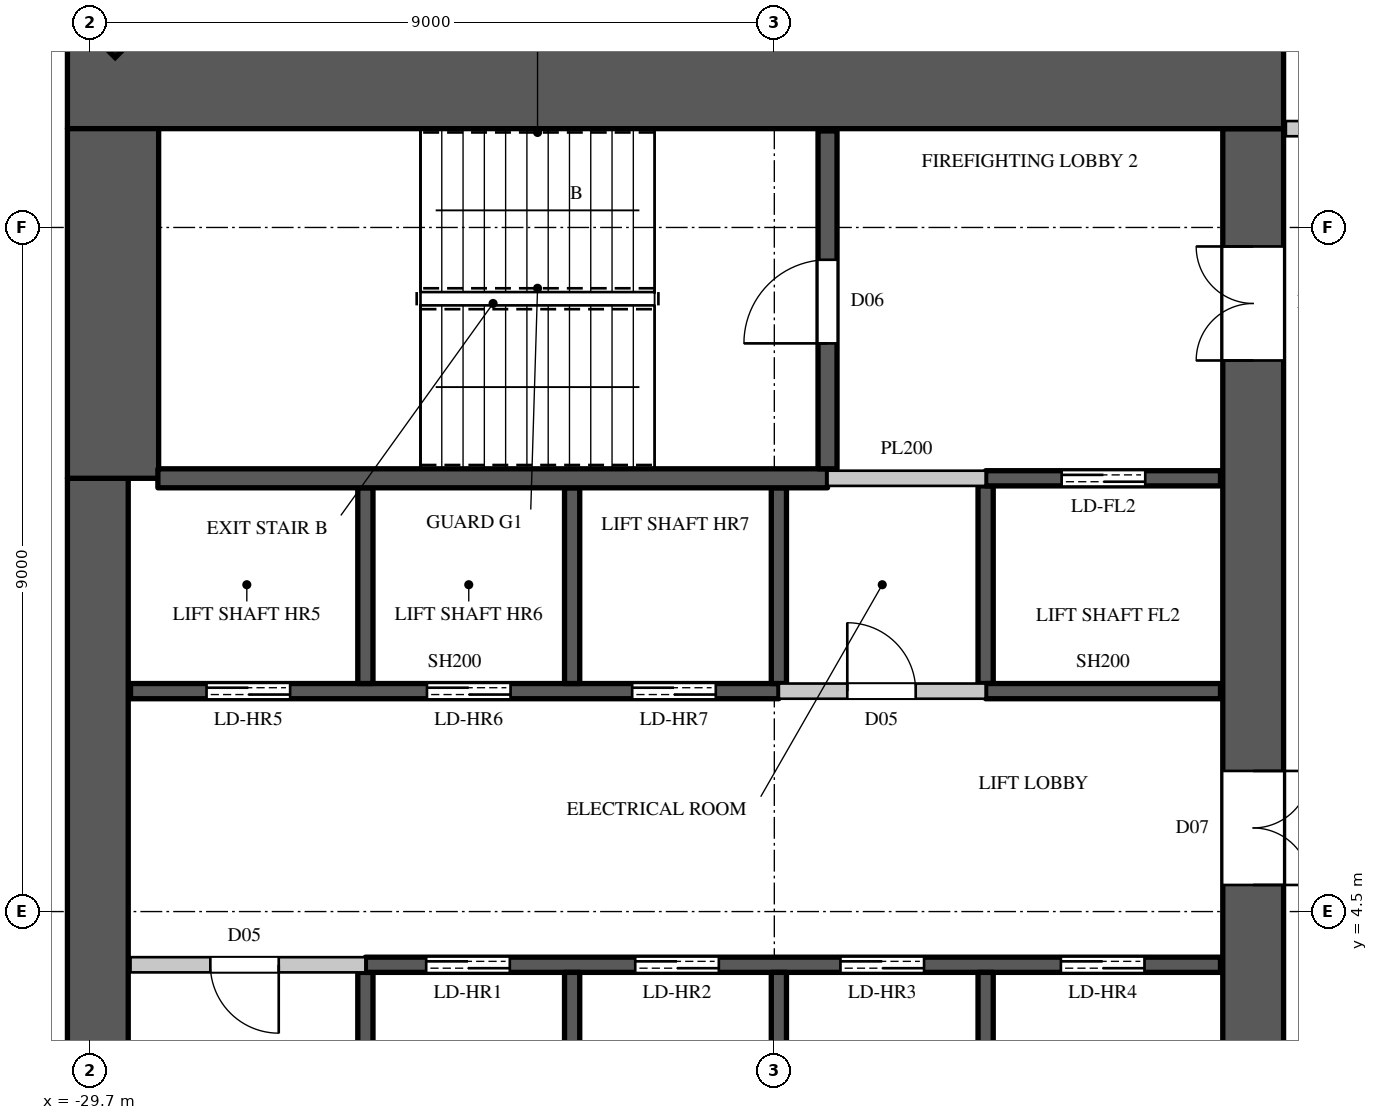
"""IFC4 building model, lengths in metres.
Left out: names, types, materials, properties, quantities, classifications, styles, units other than length and angle.
Written with IfcOpenShell. Run it as: python <this file> out.ifc"""

import sys

from ifc_helpers import new_model, si_unit, direction, frame, frame_2d, origin, origin_2d, place, context, subcontext, project, spatial, rectangle, extrude, element, fill, save


model = new_model("IFC4")
c1 = context("Model", 3, precision=1e-05, world=origin(), true_north=direction((0.0, 1.0)))
c2 = subcontext(c1, "Body", "Model", "MODEL_VIEW")
j1 = project(units=[si_unit("LENGTHUNIT", "METRE"), si_unit("PLANEANGLEUNIT", "RADIAN")], contexts=[c1])
p1 = place(None, origin())
s1 = spatial("IfcSite", under=j1, at=p1, CompositionType="ELEMENT")
p2 = place(p1, origin())
s2 = spatial("IfcBuilding", under=s1, at=p2, CompositionType="ELEMENT")
p3 = place(p2, frame((0.0, 0.0, 226.1)))
s3 = spatial("IfcBuildingStorey", under=s2, at=p3, CompositionType="ELEMENT", Elevation=226.1)
p4 = place(p3, frame((-29.443, 16.443, 0.0), z_axis=(0.0, 0.0, 1.0), x_axis=(-0.707106781187, -0.707106781187, 0.0)))
e1 = element("IfcColumn", 1, at=p4, inside=s3, PredefinedType="COLUMN", context=c2, shape_type="SweptSolid", body=[
    extrude(rectangle(XDim=0.9, YDim=1.1, at=origin_2d()), origin(), (0.0, 0.0, 1.0), 4.1),
])
p5 = place(p3, frame((-30.0, 15.4, 0.0), z_axis=(0.0, 0.0, 1.0), x_axis=(1.0, 0.0, 0.0)))
e2 = element("IfcWall", 2, at=p5, inside=s3, PredefinedType="SHEAR", context=c2, shape_type="SweptSolid", body=[
    extrude(rectangle(XDim=16.0, YDim=1.2, at=frame_2d((8.0, 0.0))), origin(), (0.0, 0.0, 1.0), 4.1),
])
p6 = place(p3, frame((-14.4, -14.8, 0.0), z_axis=(0.0, 0.0, 1.0), x_axis=(0.0, 1.0, 0.0)))
e3 = element("IfcWall", 3, at=p6, inside=s3, PredefinedType="SHEAR", context=c2, shape_type="SweptSolid", body=[
    extrude(rectangle(XDim=29.6, YDim=0.8, at=frame_2d((14.8, 0.0))), origin(), (0.0, 0.0, 1.0), 4.1),
])
p7 = place(p6, frame((1.55, 0.0, 0.0)))
e4 = element("IfcOpeningElement", 4, at=p7, cuts=e3, PredefinedType="OPENING", context=c2, shape_type="SweptSolid", body=[
    extrude(rectangle(XDim=1.5, YDim=2.4, at=frame_2d((0.75, 1.2))), frame((0.0, 0.41, 0.0), z_axis=(0.0, -1.0, 0.0), x_axis=(1.0, 0.0, 0.0)), (0.0, 0.0, 1.0), 0.82),
])
p8 = place(p6, frame((26.55, 0.0, 0.0)))
e5 = element("IfcOpeningElement", 5, at=p8, cuts=e3, PredefinedType="OPENING", context=c2, shape_type="SweptSolid", body=[
    extrude(rectangle(XDim=1.5, YDim=2.4, at=frame_2d((0.75, 1.2))), frame((0.0, 0.41, 0.0), z_axis=(0.0, -1.0, 0.0), x_axis=(1.0, 0.0, 0.0)), (0.0, 0.0, 1.0), 0.82),
])
p9 = place(p6, frame((8.45, 0.0, 0.0)))
e6 = element("IfcOpeningElement", 6, at=p9, cuts=e3, PredefinedType="OPENING", context=c2, shape_type="SweptSolid", body=[
    extrude(rectangle(XDim=1.5, YDim=2.4, at=frame_2d((0.75, 1.2))), frame((0.0, 0.41, 0.0), z_axis=(0.0, -1.0, 0.0), x_axis=(1.0, 0.0, 0.0)), (0.0, 0.0, 1.0), 0.82),
])
p10 = place(p6, frame((19.65, 0.0, 0.0)))
e7 = element("IfcOpeningElement", 7, at=p10, cuts=e3, PredefinedType="OPENING", context=c2, shape_type="SweptSolid", body=[
    extrude(rectangle(XDim=1.5, YDim=2.4, at=frame_2d((0.75, 1.2))), frame((0.0, 0.41, 0.0), z_axis=(0.0, -1.0, 0.0), x_axis=(1.0, 0.0, 0.0)), (0.0, 0.0, 1.0), 0.82),
])
p11 = place(p6, frame((14.5, 0.0, 0.0)))
e8 = element("IfcOpeningElement", 8, at=p11, cuts=e3, PredefinedType="OPENING", context=c2, shape_type="SweptSolid", body=[
    extrude(rectangle(XDim=0.6, YDim=2.0, at=frame_2d((0.3, 1.0))), frame((0.0, 0.41, 0.0), z_axis=(0.0, -1.0, 0.0), x_axis=(1.0, 0.0, 0.0)), (0.0, 0.0, 1.0), 0.82),
])
p12 = place(p3, frame((-29.6, -10.2, 0.0), z_axis=(0.0, 0.0, 1.0), x_axis=(0.0, 1.0, 0.0)))
e9 = element("IfcWall", 9, at=p12, inside=s3, PredefinedType="SHEAR", context=c2, shape_type="SweptSolid", body=[
    extrude(rectangle(XDim=20.4, YDim=0.8, at=frame_2d((10.2, 0.0))), origin(), (0.0, 0.0, 1.0), 4.1),
])
p13 = place(p3, frame((-29.4, 10.2, 0.0), z_axis=(0.0, 0.0, 1.0), x_axis=(0.0, 1.0, 0.0)))
e10 = element("IfcWall", 10, at=p13, inside=s3, PredefinedType="SHEAR", context=c2, shape_type="SweptSolid", body=[
    extrude(rectangle(XDim=4.6, YDim=1.2, at=frame_2d((2.3, 0.0))), origin(), (0.0, 0.0, 1.0), 4.1),
])
p14 = place(p3, frame((-29.17, 3.8, 0.0), z_axis=(0.0, 0.0, 1.0), x_axis=(1.0, 0.0, 0.0)))
e11 = element("IfcWall", 11, at=p14, inside=s3, PredefinedType="PARTITIONING", context=c2, shape_type="SweptSolid", body=[
    extrude(rectangle(XDim=3.09, YDim=0.2, at=frame_2d((1.545, 0.0))), origin(), (0.0, 0.0, 1.0), 3.8),
])
p15 = place(p14, frame((1.05, 0.0, 0.0)))
e12 = element("IfcOpeningElement", 12, at=p15, cuts=e11, PredefinedType="OPENING", context=c2, shape_type="SweptSolid", body=[
    extrude(rectangle(XDim=0.9, YDim=2.2, at=frame_2d((0.45, 1.1))), frame((0.0, 0.11, 0.0), z_axis=(0.0, -1.0, 0.0), x_axis=(1.0, 0.0, 0.0)), (0.0, 0.0, 1.0), 0.22),
])
p16 = place(p3, frame((-13.97, 14.8, 0.0), z_axis=(0.0, 0.0, 1.0), x_axis=(1.0, 0.0, 0.0)))
e13 = element("IfcWall", 13, at=p16, inside=s3, PredefinedType="PARTITIONING", context=c2, shape_type="SweptSolid", body=[
    extrude(rectangle(XDim=2.87, YDim=0.2, at=frame_2d((1.435, 0.0))), origin(), (0.0, 0.0, 1.0), 3.8),
])
p17 = place(p3, frame((-20.64, 7.4, 0.0), z_axis=(0.0, 0.0, 1.0), x_axis=(1.0, 0.0, 0.0)))
e14 = element("IfcWall", 14, at=p17, inside=s3, PredefinedType="PARTITIONING", context=c2, shape_type="SweptSolid", body=[
    extrude(rectangle(XDim=2.72, YDim=0.2, at=frame_2d((1.36, 0.0))), origin(), (0.0, 0.0, 1.0), 3.8),
])
p18 = place(p17, frame((0.9, 0.0, 0.0)))
e15 = element("IfcOpeningElement", 15, at=p18, cuts=e14, PredefinedType="OPENING", context=c2, shape_type="SweptSolid", body=[
    extrude(rectangle(XDim=0.9, YDim=2.2, at=frame_2d((0.45, 1.1))), frame((0.0, 0.11, 0.0), z_axis=(0.0, -1.0, 0.0), x_axis=(1.0, 0.0, 0.0)), (0.0, 0.0, 1.0), 0.22),
])
p19 = place(p3, frame((-20.0, 10.2, 0.0), z_axis=(0.0, 0.0, 1.0), x_axis=(1.0, 0.0, 0.0)))
e16 = element("IfcWall", 16, at=p19, inside=s3, PredefinedType="PARTITIONING", context=c2, shape_type="SweptSolid", body=[
    extrude(rectangle(XDim=2.08, YDim=0.2, at=frame_2d((1.04, 0.0))), origin(), (0.0, 0.0, 1.0), 3.8),
])
p20 = place(p3, frame((-29.17, 7.4, 0.0), z_axis=(0.0, 0.0, 1.0), x_axis=(1.0, 0.0, 0.0)))
e17 = element("IfcWall", 17, at=p20, inside=s3, PredefinedType="SHEAR", context=c2, shape_type="SweptSolid", body=[
    extrude(rectangle(XDim=8.53, YDim=0.2, at=frame_2d((4.265, 0.0))), origin(), (0.0, 0.0, 1.0), 3.8),
])
p21 = place(p20, frame((1.0, 0.0, 0.0)))
e18 = element("IfcOpeningElement", 18, at=p21, cuts=e17, PredefinedType="OPENING", context=c2, shape_type="SweptSolid", body=[
    extrude(rectangle(XDim=1.1, YDim=2.2, at=frame_2d((0.55, 1.1))), frame((0.0, 0.11, 0.0), z_axis=(0.0, -1.0, 0.0), x_axis=(1.0, 0.0, 0.0)), (0.0, 0.0, 1.0), 0.22),
])
p22 = place(p20, frame((3.9, 0.0, 0.0)))
e19 = element("IfcOpeningElement", 19, at=p22, cuts=e17, PredefinedType="OPENING", context=c2, shape_type="SweptSolid", body=[
    extrude(rectangle(XDim=1.1, YDim=2.2, at=frame_2d((0.55, 1.1))), frame((0.0, 0.11, 0.0), z_axis=(0.0, -1.0, 0.0), x_axis=(1.0, 0.0, 0.0)), (0.0, 0.0, 1.0), 0.22),
])
p23 = place(p20, frame((6.6, 0.0, 0.0)))
e20 = element("IfcOpeningElement", 20, at=p23, cuts=e17, PredefinedType="OPENING", context=c2, shape_type="SweptSolid", body=[
    extrude(rectangle(XDim=1.1, YDim=2.2, at=frame_2d((0.55, 1.1))), frame((0.0, 0.11, 0.0), z_axis=(0.0, -1.0, 0.0), x_axis=(1.0, 0.0, 0.0)), (0.0, 0.0, 1.0), 0.22),
])
p24 = place(p3, frame((-26.08, 1.1, 0.0), z_axis=(0.0, 0.0, 1.0), x_axis=(0.0, 1.0, 0.0)))
e21 = element("IfcWall", 21, at=p24, inside=s3, PredefinedType="SHEAR", context=c2, shape_type="SweptSolid", body=[
    extrude(rectangle(XDim=2.6, YDim=0.2, at=frame_2d((1.3, 0.0))), origin(), (0.0, 0.0, 1.0), 3.8),
])
p25 = place(p3, frame((-26.08, 3.8, 0.0), z_axis=(0.0, 0.0, 1.0), x_axis=(1.0, 0.0, 0.0)))
e22 = element("IfcWall", 22, at=p25, inside=s3, PredefinedType="SHEAR", context=c2, shape_type="SweptSolid", body=[
    extrude(rectangle(XDim=11.25, YDim=0.2, at=frame_2d((5.625, 0.0))), origin(), (0.0, 0.0, 1.0), 3.8),
])
p26 = place(p25, frame((0.8, 0.0, 0.0)))
e23 = element("IfcOpeningElement", 23, at=p26, cuts=e22, PredefinedType="OPENING", context=c2, shape_type="SweptSolid", body=[
    extrude(rectangle(XDim=1.1, YDim=2.2, at=frame_2d((0.55, 1.1))), frame((0.0, 0.11, 0.0), z_axis=(0.0, -1.0, 0.0), x_axis=(1.0, 0.0, 0.0)), (0.0, 0.0, 1.0), 0.22),
])
p27 = place(p25, frame((3.55, 0.0, 0.0)))
e24 = element("IfcOpeningElement", 24, at=p27, cuts=e22, PredefinedType="OPENING", context=c2, shape_type="SweptSolid", body=[
    extrude(rectangle(XDim=1.1, YDim=2.2, at=frame_2d((0.55, 1.1))), frame((0.0, 0.11, 0.0), z_axis=(0.0, -1.0, 0.0), x_axis=(1.0, 0.0, 0.0)), (0.0, 0.0, 1.0), 0.22),
])
p28 = place(p25, frame((6.25, 0.0, 0.0)))
e25 = element("IfcOpeningElement", 25, at=p28, cuts=e22, PredefinedType="OPENING", context=c2, shape_type="SweptSolid", body=[
    extrude(rectangle(XDim=1.1, YDim=2.2, at=frame_2d((0.55, 1.1))), frame((0.0, 0.11, 0.0), z_axis=(0.0, -1.0, 0.0), x_axis=(1.0, 0.0, 0.0)), (0.0, 0.0, 1.0), 0.22),
])
p29 = place(p25, frame((9.15, 0.0, 0.0)))
e26 = element("IfcOpeningElement", 26, at=p29, cuts=e22, PredefinedType="OPENING", context=c2, shape_type="SweptSolid", body=[
    extrude(rectangle(XDim=1.1, YDim=2.2, at=frame_2d((0.55, 1.1))), frame((0.0, 0.11, 0.0), z_axis=(0.0, -1.0, 0.0), x_axis=(1.0, 0.0, 0.0)), (0.0, 0.0, 1.0), 0.22),
])
p30 = place(p3, frame((-26.08, 7.5, 0.0), z_axis=(0.0, 0.0, 1.0), x_axis=(0.0, 1.0, 0.0)))
e27 = element("IfcWall", 27, at=p30, inside=s3, PredefinedType="SHEAR", context=c2, shape_type="SweptSolid", body=[
    extrude(rectangle(XDim=2.575, YDim=0.2, at=frame_2d((1.288, 0.0))), origin(), (0.0, 0.0, 1.0), 4.1),
])
p31 = place(p3, frame((-23.36, 1.1, 0.0), z_axis=(0.0, 0.0, 1.0), x_axis=(0.0, 1.0, 0.0)))
e28 = element("IfcWall", 28, at=p31, inside=s3, PredefinedType="SHEAR", context=c2, shape_type="SweptSolid", body=[
    extrude(rectangle(XDim=2.6, YDim=0.2, at=frame_2d((1.3, 0.0))), origin(), (0.0, 0.0, 1.0), 4.1),
])
p32 = place(p3, frame((-23.36, 7.5, 0.0), z_axis=(0.0, 0.0, 1.0), x_axis=(0.0, 1.0, 0.0)))
e29 = element("IfcWall", 29, at=p32, inside=s3, PredefinedType="SHEAR", context=c2, shape_type="SweptSolid", body=[
    extrude(rectangle(XDim=2.575, YDim=0.2, at=frame_2d((1.288, 0.0))), origin(), (0.0, 0.0, 1.0), 4.1),
])
p33 = place(p3, frame((-20.64, 1.1, 0.0), z_axis=(0.0, 0.0, 1.0), x_axis=(0.0, 1.0, 0.0)))
e30 = element("IfcWall", 30, at=p33, inside=s3, PredefinedType="SHEAR", context=c2, shape_type="SweptSolid", body=[
    extrude(rectangle(XDim=2.6, YDim=0.2, at=frame_2d((1.3, 0.0))), origin(), (0.0, 0.0, 1.0), 4.1),
])
p34 = place(p3, frame((-20.64, 7.5, 0.0), z_axis=(0.0, 0.0, 1.0), x_axis=(0.0, 1.0, 0.0)))
e31 = element("IfcWall", 31, at=p34, inside=s3, PredefinedType="SHEAR", context=c2, shape_type="SweptSolid", body=[
    extrude(rectangle(XDim=2.575, YDim=0.2, at=frame_2d((1.288, 0.0))), origin(), (0.0, 0.0, 1.0), 3.8),
])
p35 = place(p3, frame((-17.92, 1.1, 0.0), z_axis=(0.0, 0.0, 1.0), x_axis=(0.0, 1.0, 0.0)))
e32 = element("IfcWall", 32, at=p35, inside=s3, PredefinedType="SHEAR", context=c2, shape_type="SweptSolid", body=[
    extrude(rectangle(XDim=2.6, YDim=0.2, at=frame_2d((1.3, 0.0))), origin(), (0.0, 0.0, 1.0), 4.1),
])
p36 = place(p3, frame((-17.92, 7.5, 0.0), z_axis=(0.0, 0.0, 1.0), x_axis=(0.0, 1.0, 0.0)))
e33 = element("IfcWall", 33, at=p36, inside=s3, PredefinedType="SHEAR", context=c2, shape_type="SweptSolid", body=[
    extrude(rectangle(XDim=2.6, YDim=0.2, at=frame_2d((1.3, 0.0))), origin(), (0.0, 0.0, 1.0), 3.8),
])
p37 = place(p3, frame((-17.92, 7.4, 0.0), z_axis=(0.0, 0.0, 1.0), x_axis=(1.0, 0.0, 0.0)))
e34 = element("IfcWall", 34, at=p37, inside=s3, PredefinedType="SHEAR", context=c2, shape_type="SweptSolid", body=[
    extrude(rectangle(XDim=3.09, YDim=0.2, at=frame_2d((1.545, 0.0))), origin(), (0.0, 0.0, 1.0), 3.8),
])
p38 = place(p3, frame((-17.92, 10.2, 0.0), z_axis=(0.0, 0.0, 1.0), x_axis=(1.0, 0.0, 0.0)))
e35 = element("IfcWall", 35, at=p38, inside=s3, PredefinedType="SHEAR", context=c2, shape_type="SweptSolid", body=[
    extrude(rectangle(XDim=3.09, YDim=0.2, at=frame_2d((1.545, 0.0))), origin(), (0.0, 0.0, 1.0), 3.8),
])
p39 = place(p38, frame((1.0, 0.0, 0.0)))
e36 = element("IfcOpeningElement", 36, at=p39, cuts=e35, PredefinedType="OPENING", context=c2, shape_type="SweptSolid", body=[
    extrude(rectangle(XDim=1.1, YDim=2.2, at=frame_2d((0.55, 1.1))), frame((0.0, 0.11, 0.0), z_axis=(0.0, -1.0, 0.0), x_axis=(1.0, 0.0, 0.0)), (0.0, 0.0, 1.0), 0.22),
])
p40 = place(p3, frame((-28.81, 10.2, 0.0), z_axis=(0.0, 0.0, 1.0), x_axis=(1.0, 0.0, 0.0)))
e37 = element("IfcWall", 37, at=p40, inside=s3, PredefinedType="SHEAR", context=c2, shape_type="SweptSolid", body=[
    extrude(rectangle(XDim=8.81, YDim=0.25, at=frame_2d((4.405, 0.0))), origin(), (0.0, 0.0, 1.0), 3.8),
])
p41 = place(p3, frame((-20.0, 10.325, 0.0), z_axis=(0.0, 0.0, 1.0), x_axis=(0.0, 1.0, 0.0)))
e38 = element("IfcWall", 38, at=p41, inside=s3, PredefinedType="SHEAR", context=c2, shape_type="SweptSolid", body=[
    extrude(rectangle(XDim=4.445, YDim=0.25, at=frame_2d((2.223, 0.0))), origin(), (0.0, 0.0, 1.0), 3.8),
])
p42 = place(p41, frame((1.65, 0.0, 0.0)))
e39 = element("IfcOpeningElement", 39, at=p42, cuts=e38, PredefinedType="OPENING", context=c2, shape_type="SweptSolid", body=[
    extrude(rectangle(XDim=1.1, YDim=2.2, at=frame_2d((0.55, 1.1))), frame((0.0, 0.135, 0.0), z_axis=(0.0, -1.0, 0.0), x_axis=(1.0, 0.0, 0.0)), (0.0, 0.0, 1.0), 0.27),
])
p43 = place(p42, origin())
e40 = element("IfcDoor", 40, at=p43, inside=s3, OperationType="SINGLE_SWING_LEFT", PredefinedType="DOOR", context=c2, shape_type="SweptSolid", body=[
    extrude(rectangle(XDim=1.1, YDim=2.2, at=frame_2d((0.55, 1.1))), frame((0.0, 0.025, 0.0), z_axis=(0.0, -1.0, 0.0), x_axis=(1.0, 0.0, 0.0)), (0.0, 0.0, 1.0), 0.05),
])
fill(e39, e40)
p44 = place(p15, origin())
e41 = element("IfcDoor", 41, at=p44, inside=s3, OperationType="SINGLE_SWING_LEFT", PredefinedType="DOOR", context=c2, shape_type="SweptSolid", body=[
    extrude(rectangle(XDim=0.9, YDim=2.2, at=frame_2d((0.45, 1.1))), frame((0.0, 0.025, 0.0), z_axis=(0.0, -1.0, 0.0), x_axis=(1.0, 0.0, 0.0)), (0.0, 0.0, 1.0), 0.05),
])
fill(e12, e41)
p45 = place(p18, origin())
e42 = element("IfcDoor", 42, at=p45, inside=s3, OperationType="SINGLE_SWING_LEFT", PredefinedType="DOOR", context=c2, shape_type="SweptSolid", body=[
    extrude(rectangle(XDim=0.9, YDim=2.2, at=frame_2d((0.45, 1.1))), frame((0.0, 0.025, 0.0), z_axis=(0.0, -1.0, 0.0), x_axis=(1.0, 0.0, 0.0)), (0.0, 0.0, 1.0), 0.05),
])
fill(e15, e42)
p46 = place(p26, origin())
e43 = element("IfcDoor", 43, at=p46, inside=s3, OperationType="DOUBLE_DOOR_SLIDING", PredefinedType="DOOR", context=c2, shape_type="SweptSolid", body=[
    extrude(rectangle(XDim=1.1, YDim=2.2, at=frame_2d((0.55, 1.1))), frame((0.0, 0.025, 0.0), z_axis=(0.0, -1.0, 0.0), x_axis=(1.0, 0.0, 0.0)), (0.0, 0.0, 1.0), 0.05),
])
fill(e23, e43)
p47 = place(p27, origin())
e44 = element("IfcDoor", 44, at=p47, inside=s3, OperationType="DOUBLE_DOOR_SLIDING", PredefinedType="DOOR", context=c2, shape_type="SweptSolid", body=[
    extrude(rectangle(XDim=1.1, YDim=2.2, at=frame_2d((0.55, 1.1))), frame((0.0, 0.025, 0.0), z_axis=(0.0, -1.0, 0.0), x_axis=(1.0, 0.0, 0.0)), (0.0, 0.0, 1.0), 0.05),
])
fill(e24, e44)
p48 = place(p28, origin())
e45 = element("IfcDoor", 45, at=p48, inside=s3, OperationType="DOUBLE_DOOR_SLIDING", PredefinedType="DOOR", context=c2, shape_type="SweptSolid", body=[
    extrude(rectangle(XDim=1.1, YDim=2.2, at=frame_2d((0.55, 1.1))), frame((0.0, 0.025, 0.0), z_axis=(0.0, -1.0, 0.0), x_axis=(1.0, 0.0, 0.0)), (0.0, 0.0, 1.0), 0.05),
])
fill(e25, e45)
p49 = place(p29, origin())
e46 = element("IfcDoor", 46, at=p49, inside=s3, OperationType="DOUBLE_DOOR_SLIDING", PredefinedType="DOOR", context=c2, shape_type="SweptSolid", body=[
    extrude(rectangle(XDim=1.1, YDim=2.2, at=frame_2d((0.55, 1.1))), frame((0.0, 0.025, 0.0), z_axis=(0.0, -1.0, 0.0), x_axis=(1.0, 0.0, 0.0)), (0.0, 0.0, 1.0), 0.05),
])
fill(e26, e46)
p50 = place(p21, origin())
e47 = element("IfcDoor", 47, at=p50, inside=s3, OperationType="DOUBLE_DOOR_SLIDING", PredefinedType="DOOR", context=c2, shape_type="SweptSolid", body=[
    extrude(rectangle(XDim=1.1, YDim=2.2, at=frame_2d((0.55, 1.1))), frame((0.0, 0.025, 0.0), z_axis=(0.0, -1.0, 0.0), x_axis=(1.0, 0.0, 0.0)), (0.0, 0.0, 1.0), 0.05),
])
fill(e18, e47)
p51 = place(p22, origin())
e48 = element("IfcDoor", 48, at=p51, inside=s3, OperationType="DOUBLE_DOOR_SLIDING", PredefinedType="DOOR", context=c2, shape_type="SweptSolid", body=[
    extrude(rectangle(XDim=1.1, YDim=2.2, at=frame_2d((0.55, 1.1))), frame((0.0, 0.025, 0.0), z_axis=(0.0, -1.0, 0.0), x_axis=(1.0, 0.0, 0.0)), (0.0, 0.0, 1.0), 0.05),
])
fill(e19, e48)
p52 = place(p23, origin())
e49 = element("IfcDoor", 49, at=p52, inside=s3, OperationType="DOUBLE_DOOR_SLIDING", PredefinedType="DOOR", context=c2, shape_type="SweptSolid", body=[
    extrude(rectangle(XDim=1.1, YDim=2.2, at=frame_2d((0.55, 1.1))), frame((0.0, 0.025, 0.0), z_axis=(0.0, -1.0, 0.0), x_axis=(1.0, 0.0, 0.0)), (0.0, 0.0, 1.0), 0.05),
])
fill(e20, e49)
p53 = place(p39, origin())
e50 = element("IfcDoor", 50, at=p53, inside=s3, OperationType="DOUBLE_DOOR_SLIDING", PredefinedType="DOOR", context=c2, shape_type="SweptSolid", body=[
    extrude(rectangle(XDim=1.1, YDim=2.2, at=frame_2d((0.55, 1.1))), frame((0.0, 0.025, 0.0), z_axis=(0.0, -1.0, 0.0), x_axis=(1.0, 0.0, 0.0)), (0.0, 0.0, 1.0), 0.05),
])
fill(e36, e50)
p54 = place(p8, origin())
e51 = element("IfcDoor", 51, at=p54, inside=s3, OperationType="DOUBLE_DOOR_SINGLE_SWING", PredefinedType="DOOR", context=c2, shape_type="SweptSolid", body=[
    extrude(rectangle(XDim=1.5, YDim=2.4, at=frame_2d((0.75, 1.2))), frame((0.0, 0.395, 0.0), z_axis=(0.0, -1.0, 0.0), x_axis=(1.0, 0.0, 0.0)), (0.0, 0.0, 1.0), 0.05),
])
fill(e5, e51)
p55 = place(p10, origin())
e52 = element("IfcDoor", 52, at=p55, inside=s3, OperationType="DOUBLE_DOOR_SINGLE_SWING", PredefinedType="DOOR", context=c2, shape_type="SweptSolid", body=[
    extrude(rectangle(XDim=1.5, YDim=2.4, at=frame_2d((0.75, 1.2))), frame((0.0, -0.345, 0.0), z_axis=(0.0, -1.0, 0.0), x_axis=(1.0, 0.0, 0.0)), (0.0, 0.0, 1.0), 0.05),
])
fill(e7, e52)
save(model, sys.argv[1])
